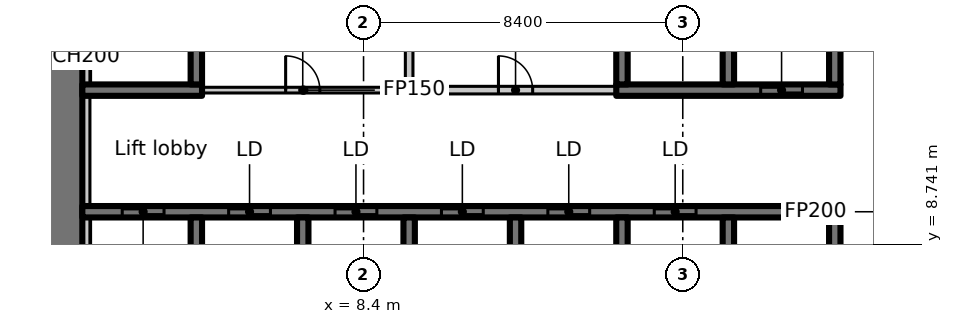
"""IFC4 building model, lengths in metres.
Left out: names, types, materials, properties, quantities, classifications, styles, units other than length and angle.
Written with IfcOpenShell. Run it as: python <this file> out.ifc"""

import sys

from ifc_helpers import new_model, si_unit, direction, frame, frame_2d, origin, place, context, subcontext, project, spatial, rectangle, extrude, element, fill, save


model = new_model("IFC4")
c1 = context("Model", 3, precision=1e-05, world=origin(), true_north=direction((0.0, 1.0)))
c2 = subcontext(c1, "Body", "Model", "MODEL_VIEW")
j1 = project(units=[si_unit("LENGTHUNIT", "METRE"), si_unit("PLANEANGLEUNIT", "RADIAN")], contexts=[c1])
p1 = place(None, origin())
s1 = spatial("IfcSite", under=j1, at=p1, CompositionType="ELEMENT")
p2 = place(p1, origin())
s2 = spatial("IfcBuilding", under=s1, at=p2, CompositionType="ELEMENT")
p3 = place(p2, frame((0.0, 0.0, 79.7)))
s3 = spatial("IfcBuildingStorey", under=s2, at=p3, CompositionType="ELEMENT", Elevation=79.7)
p4 = place(p3, frame((0.5, 6.936, 0.0), z_axis=(0.0, 0.0, 1.0), x_axis=(0.0, 1.0, 0.0)))
e1 = element("IfcWall", 1, at=p4, inside=s3, PredefinedType="SHEAR", context=c2, shape_type="SweptSolid", body=[
    extrude(rectangle(XDim=8.864, YDim=1.0, at=frame_2d((4.432, 0.0))), origin(), (0.0, 0.0, 1.0), 3.35),
])
p5 = place(p3, frame((1.0, 9.6, 0.0), z_axis=(0.0, 0.0, 1.0), x_axis=(1.0, 0.0, 0.0)))
e2 = element("IfcWall", 2, at=p5, inside=s3, PredefinedType="SHEAR", context=c2, shape_type="SweptSolid", body=[
    extrude(rectangle(XDim=19.95, YDim=0.3, at=frame_2d((9.975, 0.0))), origin(), (0.0, 0.0, 1.0), 3.35),
])
p6 = place(p5, frame((1.05, 0.0, 0.0)))
e3 = element("IfcOpeningElement", 3, at=p6, cuts=e2, PredefinedType="OPENING", context=c2, shape_type="SweptSolid", body=[
    extrude(rectangle(XDim=1.1, YDim=2.3, at=frame_2d((0.55, 1.15))), frame((0.0, 0.16, 0.0), z_axis=(0.0, -1.0, 0.0), x_axis=(1.0, 0.0, 0.0)), (0.0, 0.0, 1.0), 0.32),
])
p7 = place(p5, frame((3.85, 0.0, 0.0)))
e4 = element("IfcOpeningElement", 4, at=p7, cuts=e2, PredefinedType="OPENING", context=c2, shape_type="SweptSolid", body=[
    extrude(rectangle(XDim=1.1, YDim=2.3, at=frame_2d((0.55, 1.15))), frame((0.0, 0.16, 0.0), z_axis=(0.0, -1.0, 0.0), x_axis=(1.0, 0.0, 0.0)), (0.0, 0.0, 1.0), 0.32),
])
p8 = place(p5, frame((6.65, 0.0, 0.0)))
e5 = element("IfcOpeningElement", 5, at=p8, cuts=e2, PredefinedType="OPENING", context=c2, shape_type="SweptSolid", body=[
    extrude(rectangle(XDim=1.1, YDim=2.3, at=frame_2d((0.55, 1.15))), frame((0.0, 0.16, 0.0), z_axis=(0.0, -1.0, 0.0), x_axis=(1.0, 0.0, 0.0)), (0.0, 0.0, 1.0), 0.32),
])
p9 = place(p5, frame((9.45, 0.0, 0.0)))
e6 = element("IfcOpeningElement", 6, at=p9, cuts=e2, PredefinedType="OPENING", context=c2, shape_type="SweptSolid", body=[
    extrude(rectangle(XDim=1.1, YDim=2.3, at=frame_2d((0.55, 1.15))), frame((0.0, 0.16, 0.0), z_axis=(0.0, -1.0, 0.0), x_axis=(1.0, 0.0, 0.0)), (0.0, 0.0, 1.0), 0.32),
])
p10 = place(p5, frame((12.25, 0.0, 0.0)))
e7 = element("IfcOpeningElement", 7, at=p10, cuts=e2, PredefinedType="OPENING", context=c2, shape_type="SweptSolid", body=[
    extrude(rectangle(XDim=1.1, YDim=2.3, at=frame_2d((0.55, 1.15))), frame((0.0, 0.16, 0.0), z_axis=(0.0, -1.0, 0.0), x_axis=(1.0, 0.0, 0.0)), (0.0, 0.0, 1.0), 0.32),
])
p11 = place(p5, frame((15.05, 0.0, 0.0)))
e8 = element("IfcOpeningElement", 8, at=p11, cuts=e2, PredefinedType="OPENING", context=c2, shape_type="SweptSolid", body=[
    extrude(rectangle(XDim=1.1, YDim=2.3, at=frame_2d((0.55, 1.15))), frame((0.0, 0.16, 0.0), z_axis=(0.0, -1.0, 0.0), x_axis=(1.0, 0.0, 0.0)), (0.0, 0.0, 1.0), 0.32),
])
for number, where, z_axis, x_axis in (
    (9, (4.0, 7.15, 0.0), (0.0, 0.0, 1.0), (0.0, 1.0, 0.0)),
    (10, (6.8, 7.15, 0.0), (0.0, 0.0, 1.0), (0.0, 1.0, 0.0)),
    (11, (9.6, 7.15, 0.0), (0.0, 0.0, 1.0), (0.0, 1.0, 0.0)),
    (12, (12.4, 7.15, 0.0), (0.0, 0.0, 1.0), (0.0, 1.0, 0.0)),
    (13, (15.2, 7.15, 0.0), (0.0, 0.0, 1.0), (0.0, 1.0, 0.0)),
    (14, (18.0, 7.15, 0.0), (0.0, 0.0, 1.0), (0.0, 1.0, 0.0)),
    (15, (20.8, 7.15, 0.0), (0.0, 0.0, 1.0), (0.0, 1.0, 0.0)),
):
    element("IfcWall", number, at=place(p3, frame(where, z_axis=z_axis, x_axis=x_axis)), inside=s3, PredefinedType="SHEAR", context=c2, shape_type="SweptSolid", body=[
        extrude(rectangle(XDim=2.3, YDim=0.3, at=frame_2d((1.15, 0.0))), origin(), (0.0, 0.0, 1.0), 3.35),
    ])
p12 = place(p3, frame((1.0, 12.8, 0.0), z_axis=(0.0, 0.0, 1.0), x_axis=(1.0, 0.0, 0.0)))
e16 = element("IfcWall", 16, at=p12, inside=s3, PredefinedType="SHEAR", context=c2, shape_type="SweptSolid", body=[
    extrude(rectangle(XDim=3.15, YDim=0.3, at=frame_2d((1.575, 0.0))), origin(), (0.0, 0.0, 1.0), 3.35),
])
p13 = place(p3, frame((4.0, 12.95, 0.0), z_axis=(0.0, 0.0, 1.0), x_axis=(0.0, 1.0, 0.0)))
e17 = element("IfcWall", 17, at=p13, inside=s3, PredefinedType="SHEAR", context=c2, shape_type="SweptSolid", body=[
    extrude(rectangle(XDim=2.85, YDim=0.3, at=frame_2d((1.425, 0.0))), origin(), (0.0, 0.0, 1.0), 3.35),
])
p14 = place(p3, frame((15.05, 12.8, 0.0), z_axis=(0.0, 0.0, 1.0), x_axis=(1.0, 0.0, 0.0)))
e18 = element("IfcWall", 18, at=p14, inside=s3, PredefinedType="SHEAR", context=c2, shape_type="SweptSolid", body=[
    extrude(rectangle(XDim=5.9, YDim=0.3, at=frame_2d((2.95, 0.0))), origin(), (0.0, 0.0, 1.0), 3.35),
])
p15 = place(p14, frame((3.8, 0.0, 0.0)))
e19 = element("IfcOpeningElement", 19, at=p15, cuts=e18, PredefinedType="OPENING", context=c2, shape_type="SweptSolid", body=[
    extrude(rectangle(XDim=1.1, YDim=2.3, at=frame_2d((0.55, 1.15))), frame((0.0, 0.16, 0.0), z_axis=(0.0, -1.0, 0.0), x_axis=(1.0, 0.0, 0.0)), (0.0, 0.0, 1.0), 0.32),
])
for number, where, z_axis, x_axis in (
    (20, (15.2, 12.95, 0.0), (0.0, 0.0, 1.0), (0.0, 1.0, 0.0)),
    (21, (18.0, 12.95, 0.0), (0.0, 0.0, 1.0), (0.0, 1.0, 0.0)),
    (22, (20.8, 12.95, 0.0), (0.0, 0.0, 1.0), (0.0, 1.0, 0.0)),
):
    element("IfcWall", number, at=place(p3, frame(where, z_axis=z_axis, x_axis=x_axis)), inside=s3, PredefinedType="SHEAR", context=c2, shape_type="SweptSolid", body=[
        extrude(rectangle(XDim=2.85, YDim=0.3, at=frame_2d((1.425, 0.0))), origin(), (0.0, 0.0, 1.0), 3.35),
    ])
p16 = place(p3, frame((9.6, 15.588, 0.0), z_axis=(0.0, 0.0, 1.0), x_axis=(0.0, -1.0, 0.0)))
e23 = element("IfcWall", 23, at=p16, inside=s3, PredefinedType="PARTITIONING", context=c2, shape_type="SweptSolid", body=[
    extrude(rectangle(XDim=2.788, YDim=0.2, at=frame_2d((1.394, 0.0))), origin(), (0.0, 0.0, 1.0), 3.35),
])
p17 = place(p3, frame((9.7, 12.8, 0.0), z_axis=(0.0, 0.0, 1.0), x_axis=(1.0, 0.0, 0.0)))
e24 = element("IfcWall", 24, at=p17, inside=s3, PredefinedType="PARTITIONING", context=c2, shape_type="SweptSolid", body=[
    extrude(rectangle(XDim=5.338, YDim=0.2, at=frame_2d((2.669, 0.0))), origin(), (0.0, 0.0, 1.0), 3.35),
])
p18 = place(p17, frame((2.25, 0.0, 0.0)))
e25 = element("IfcOpeningElement", 25, at=p18, cuts=e24, PredefinedType="OPENING", context=c2, shape_type="SweptSolid", body=[
    extrude(rectangle(XDim=0.9, YDim=2.1, at=frame_2d((0.45, 1.05))), frame((0.0, 0.11, 0.0), z_axis=(0.0, -1.0, 0.0), x_axis=(1.0, 0.0, 0.0)), (0.0, 0.0, 1.0), 0.22),
])
p19 = place(p3, frame((4.162, 12.8, 0.0), z_axis=(0.0, 0.0, 1.0), x_axis=(1.0, 0.0, 0.0)))
e26 = element("IfcWall", 26, at=p19, inside=s3, PredefinedType="PARTITIONING", context=c2, shape_type="SweptSolid", body=[
    extrude(rectangle(XDim=5.338, YDim=0.15, at=frame_2d((2.669, 0.0))), origin(), (0.0, 0.0, 1.0), 3.35),
])
p20 = place(p19, frame((2.188, 0.0, 0.0)))
e27 = element("IfcOpeningElement", 27, at=p20, cuts=e26, PredefinedType="OPENING", context=c2, shape_type="SweptSolid", body=[
    extrude(rectangle(XDim=0.9, YDim=2.1, at=frame_2d((0.45, 1.05))), frame((0.0, 0.085, 0.0), z_axis=(0.0, -1.0, 0.0), x_axis=(1.0, 0.0, 0.0)), (0.0, 0.0, 1.0), 0.17),
])
p21 = place(p3, frame((1.1, 7.15, 0.0), z_axis=(0.0, 0.0, 1.0), x_axis=(0.0, 1.0, 0.0)))
e28 = element("IfcWall", 28, at=p21, inside=s3, PredefinedType="PARTITIONING", context=c2, shape_type="SweptSolid", body=[
    extrude(rectangle(XDim=2.3, YDim=0.2, at=frame_2d((1.15, 0.0))), origin(), (0.0, 0.0, 1.0), 3.35),
])
p22 = place(p3, frame((1.1, 9.75, 0.0), z_axis=(0.0, 0.0, 1.0), x_axis=(0.0, 1.0, 0.0)))
e29 = element("IfcWall", 29, at=p22, inside=s3, PredefinedType="PARTITIONING", context=c2, shape_type="SweptSolid", body=[
    extrude(rectangle(XDim=2.9, YDim=0.2, at=frame_2d((1.45, 0.0))), origin(), (0.0, 0.0, 1.0), 3.35),
])
p23 = place(p3, frame((1.1, 12.95, 0.0), z_axis=(0.0, 0.0, 1.0), x_axis=(0.0, 1.0, 0.0)))
e30 = element("IfcWall", 30, at=p23, inside=s3, PredefinedType="PARTITIONING", context=c2, shape_type="SweptSolid", body=[
    extrude(rectangle(XDim=2.65, YDim=0.2, at=frame_2d((1.325, 0.0))), origin(), (0.0, 0.0, 1.0), 3.35),
])
p24 = place(p6, origin())
e31 = element("IfcDoor", 31, at=p24, inside=s3, OperationType="SLIDING_TO_LEFT", PredefinedType="DOOR", context=c2, shape_type="SweptSolid", body=[
    extrude(rectangle(XDim=1.1, YDim=2.3, at=frame_2d((0.55, 1.15))), frame((0.0, 0.025, 0.0), z_axis=(0.0, -1.0, 0.0), x_axis=(1.0, 0.0, 0.0)), (0.0, 0.0, 1.0), 0.05),
])
fill(e3, e31)
p25 = place(p7, origin())
e32 = element("IfcDoor", 32, at=p25, inside=s3, OperationType="SLIDING_TO_LEFT", PredefinedType="DOOR", context=c2, shape_type="SweptSolid", body=[
    extrude(rectangle(XDim=1.1, YDim=2.3, at=frame_2d((0.55, 1.15))), frame((0.0, 0.025, 0.0), z_axis=(0.0, -1.0, 0.0), x_axis=(1.0, 0.0, 0.0)), (0.0, 0.0, 1.0), 0.05),
])
fill(e4, e32)
p26 = place(p8, origin())
e33 = element("IfcDoor", 33, at=p26, inside=s3, OperationType="SLIDING_TO_LEFT", PredefinedType="DOOR", context=c2, shape_type="SweptSolid", body=[
    extrude(rectangle(XDim=1.1, YDim=2.3, at=frame_2d((0.55, 1.15))), frame((0.0, 0.025, 0.0), z_axis=(0.0, -1.0, 0.0), x_axis=(1.0, 0.0, 0.0)), (0.0, 0.0, 1.0), 0.05),
])
fill(e5, e33)
p27 = place(p9, origin())
e34 = element("IfcDoor", 34, at=p27, inside=s3, OperationType="SLIDING_TO_LEFT", PredefinedType="DOOR", context=c2, shape_type="SweptSolid", body=[
    extrude(rectangle(XDim=1.1, YDim=2.3, at=frame_2d((0.55, 1.15))), frame((0.0, 0.025, 0.0), z_axis=(0.0, -1.0, 0.0), x_axis=(1.0, 0.0, 0.0)), (0.0, 0.0, 1.0), 0.05),
])
fill(e6, e34)
p28 = place(p10, origin())
e35 = element("IfcDoor", 35, at=p28, inside=s3, OperationType="SLIDING_TO_LEFT", PredefinedType="DOOR", context=c2, shape_type="SweptSolid", body=[
    extrude(rectangle(XDim=1.1, YDim=2.3, at=frame_2d((0.55, 1.15))), frame((0.0, 0.025, 0.0), z_axis=(0.0, -1.0, 0.0), x_axis=(1.0, 0.0, 0.0)), (0.0, 0.0, 1.0), 0.05),
])
fill(e7, e35)
p29 = place(p11, origin())
e36 = element("IfcDoor", 36, at=p29, inside=s3, OperationType="SLIDING_TO_LEFT", PredefinedType="DOOR", context=c2, shape_type="SweptSolid", body=[
    extrude(rectangle(XDim=1.1, YDim=2.3, at=frame_2d((0.55, 1.15))), frame((0.0, 0.025, 0.0), z_axis=(0.0, -1.0, 0.0), x_axis=(1.0, 0.0, 0.0)), (0.0, 0.0, 1.0), 0.05),
])
fill(e8, e36)
p30 = place(p15, origin())
e37 = element("IfcDoor", 37, at=p30, inside=s3, OperationType="SLIDING_TO_LEFT", PredefinedType="DOOR", context=c2, shape_type="SweptSolid", body=[
    extrude(rectangle(XDim=1.1, YDim=2.3, at=frame_2d((0.55, 1.15))), frame((0.0, 0.025, 0.0), z_axis=(0.0, -1.0, 0.0), x_axis=(1.0, 0.0, 0.0)), (0.0, 0.0, 1.0), 0.05),
])
fill(e19, e37)
p31 = place(p20, origin())
e38 = element("IfcDoor", 38, at=p31, inside=s3, OperationType="SINGLE_SWING_LEFT", PredefinedType="DOOR", context=c2, shape_type="SweptSolid", body=[
    extrude(rectangle(XDim=0.9, YDim=2.1, at=frame_2d((0.45, 1.05))), frame((0.0, 0.025, 0.0), z_axis=(0.0, -1.0, 0.0), x_axis=(1.0, 0.0, 0.0)), (0.0, 0.0, 1.0), 0.05),
])
fill(e27, e38)
p32 = place(p18, origin())
e39 = element("IfcDoor", 39, at=p32, inside=s3, OperationType="SINGLE_SWING_RIGHT", PredefinedType="DOOR", context=c2, shape_type="SweptSolid", body=[
    extrude(rectangle(XDim=0.9, YDim=2.1, at=frame_2d((0.45, 1.05))), frame((0.0, 0.025, 0.0), z_axis=(0.0, -1.0, 0.0), x_axis=(1.0, 0.0, 0.0)), (0.0, 0.0, 1.0), 0.05),
])
fill(e25, e39)
save(model, sys.argv[1])
